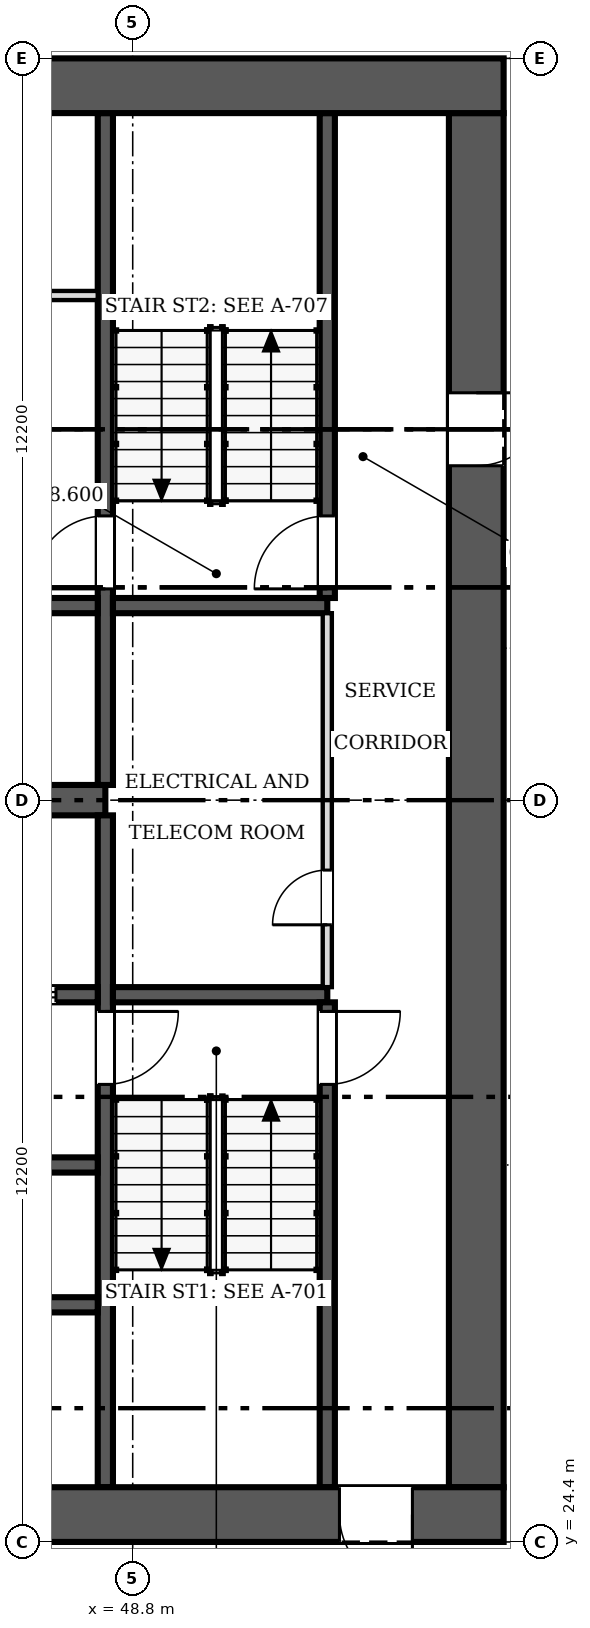
"""IFC4 building model, lengths in metres.
Left out: names, types, materials, properties, quantities, classifications, styles, units other than length and angle.
Written with IfcOpenShell. Run it as: python <this file> out.ifc"""

import sys

from ifc_helpers import new_model, si_unit, direction, frame, frame_2d, origin, place, context, subcontext, project, spatial, rectangle, extrude, source, transform, mapped, element, fill, save


model = new_model("IFC4")
c1 = context("Model", 3, precision=1e-05, world=origin(), true_north=direction((0.0, 1.0)))
c2 = subcontext(c1, "Body", "Model", "MODEL_VIEW")
j1 = project(units=[si_unit("LENGTHUNIT", "METRE"), si_unit("PLANEANGLEUNIT", "RADIAN")], contexts=[c1])
p1 = place(None, origin())
s1 = spatial("IfcSite", under=j1, at=p1, CompositionType="ELEMENT")
p2 = place(p1, origin())
s2 = spatial("IfcBuilding", under=s1, at=p2, CompositionType="ELEMENT")
p3 = place(p2, frame((0.0, 0.0, 48.6)))
s3 = spatial("IfcBuildingStorey", under=s2, at=p3, CompositionType="ELEMENT", Elevation=48.6)
p4 = place(p3, frame((54.9, 24.85, 0.0), z_axis=(0.0, 0.0, 1.0), x_axis=(-1.0, 0.0, 0.0)))
e1 = element("IfcWall", 1, at=p4, inside=s3, PredefinedType="SHEAR", context=c2, shape_type="SweptSolid", body=[
    extrude(rectangle(XDim=24.4, YDim=0.9, at=frame_2d((12.2, 0.0))), origin(), (0.0, 0.0, 1.0), 3.8),
])
m1 = source(origin(), c2, "Body", "SweptSolid", [
    extrude(rectangle(XDim=1.2, YDim=2.1, at=frame_2d((0.6, 1.05))), frame((0.0, 0.46, 0.0), z_axis=(0.0, -1.0, 0.0), x_axis=(1.0, 0.0, 0.0)), (0.0, 0.0, 1.0), 0.92),
])
p5 = place(p4, frame((1.5, 0.0, 0.0)))
e2 = element("IfcOpeningElement", 2, at=p5, cuts=e1, PredefinedType="OPENING", context=c2, shape_type="MappedRepresentation", body=[
    mapped(m1, transform((0.0, 0.0, 0.0), scale=1.0)),
])
p6 = place(p3, frame((30.5, 48.35, 0.0), z_axis=(0.0, 0.0, 1.0), x_axis=(1.0, 0.0, 0.0)))
e3 = element("IfcWall", 3, at=p6, inside=s3, PredefinedType="SHEAR", context=c2, shape_type="SweptSolid", body=[
    extrude(rectangle(XDim=24.4, YDim=0.9, at=frame_2d((12.2, 0.0))), origin(), (0.0, 0.0, 1.0), 3.8),
])
p7 = place(p3, frame((54.45, 47.9, 0.0), z_axis=(0.0, 0.0, 1.0), x_axis=(0.0, -1.0, 0.0)))
e4 = element("IfcWall", 4, at=p7, inside=s3, PredefinedType="SHEAR", context=c2, shape_type="SweptSolid", body=[
    extrude(rectangle(XDim=22.6, YDim=0.9, at=frame_2d((11.3, 0.0))), origin(), (0.0, 0.0, 1.0), 3.8),
])
p8 = place(p7, frame((4.6, 0.0, 0.0)))
e5 = element("IfcOpeningElement", 5, at=p8, cuts=e4, PredefinedType="OPENING", context=c2, shape_type="MappedRepresentation", body=[
    mapped(m1, transform((0.0, 0.0, 0.0), scale=1.0)),
])
p9 = place(p3, frame((31.4, 36.6, 0.0), z_axis=(0.0, 0.0, 1.0), x_axis=(1.0, 0.0, 0.0)))
e6 = element("IfcWall", 6, at=p9, inside=s3, PredefinedType="SHEAR", context=c2, shape_type="SweptSolid", body=[
    extrude(rectangle(XDim=16.95, YDim=0.5, at=frame_2d((8.475, 0.0))), origin(), (0.0, 0.0, 1.0), 3.8),
])
p10 = place(p3, frame((48.35, 36.35, 0.0), z_axis=(0.0, 0.0, 1.0), x_axis=(0.0, -1.0, 0.0)))
e7 = element("IfcWall", 7, at=p10, inside=s3, PredefinedType="SOLIDWALL", context=c2, shape_type="SweptSolid", body=[
    extrude(rectangle(XDim=11.05, YDim=0.25, at=frame_2d((5.525, 0.0))), origin(), (0.0, 0.0, 1.0), 3.8),
])
m2 = source(origin(), c2, "Body", "SweptSolid", [
    extrude(rectangle(XDim=1.2, YDim=2.1, at=frame_2d((0.6, 1.05))), frame((0.0, 0.135, 0.0), z_axis=(0.0, -1.0, 0.0), x_axis=(1.0, 0.0, 0.0)), (0.0, 0.0, 1.0), 0.27),
])
p11 = place(p10, frame((3.225, 0.0, 0.0)))
e8 = element("IfcOpeningElement", 8, at=p11, cuts=e7, PredefinedType="OPENING", context=c2, shape_type="MappedRepresentation", body=[
    mapped(m2, transform((0.0, 0.0, 0.0), scale=1.0)),
])
p12 = place(p3, frame((48.35, 47.9, 0.0), z_axis=(0.0, 0.0, 1.0), x_axis=(0.0, -1.0, 0.0)))
e9 = element("IfcWall", 9, at=p12, inside=s3, PredefinedType="SOLIDWALL", context=c2, shape_type="SweptSolid", body=[
    extrude(rectangle(XDim=11.05, YDim=0.25, at=frame_2d((5.525, 0.0))), origin(), (0.0, 0.0, 1.0), 3.8),
])
p13 = place(p12, frame((6.625, 0.0, 0.0)))
e10 = element("IfcOpeningElement", 10, at=p13, cuts=e9, PredefinedType="OPENING", context=c2, shape_type="MappedRepresentation", body=[
    mapped(m2, transform((0.0, 0.0, 0.0), scale=1.0)),
])
p14 = place(p3, frame((48.225, 33.4, 0.0), z_axis=(0.0, 0.0, 1.0), x_axis=(-1.0, 0.0, 0.0)))
e11 = element("IfcWall", 11, at=p14, inside=s3, PredefinedType="SOLIDWALL", context=c2, shape_type="SweptSolid", body=[
    extrude(rectangle(XDim=5.275, YDim=0.25, at=frame_2d((2.638, 0.0))), origin(), (0.0, 0.0, 1.0), 3.8),
])
p15 = place(p14, frame((3.512, 0.0, 0.0)))
e12 = element("IfcOpeningElement", 12, at=p15, cuts=e11, PredefinedType="OPENING", context=c2, shape_type="MappedRepresentation", body=[
    mapped(m2, transform((0.0, 0.0, 0.0), scale=1.0)),
])
p16 = place(p14, frame((0.688, 0.0, 0.0)))
e13 = element("IfcOpeningElement", 13, at=p16, cuts=e11, PredefinedType="OPENING", context=c2, shape_type="MappedRepresentation", body=[
    mapped(m2, transform((0.0, 0.0, 0.0), scale=1.0)),
])
p17 = place(p3, frame((48.475, 33.4, 0.0), z_axis=(0.0, 0.0, 1.0), x_axis=(1.0, 0.0, 0.0)))
e14 = element("IfcWall", 14, at=p17, inside=s3, PredefinedType="SOLIDWALL", context=c2, shape_type="SweptSolid", body=[
    extrude(rectangle(XDim=3.525, YDim=0.25, at=frame_2d((1.762, 0.0))), origin(), (0.0, 0.0, 1.0), 3.8),
])
for number, where, z_axis, x_axis in (
    (15, (42.95, 28.3, 0.0), (0.0, 0.0, 1.0), (1.0, 0.0, 0.0)),
    (16, (42.95, 39.8, 0.0), (0.0, 0.0, 1.0), (1.0, 0.0, 0.0)),
):
    element("IfcWall", number, at=place(p3, frame(where, z_axis=z_axis, x_axis=x_axis)), inside=s3, PredefinedType="SOLIDWALL", context=c2, shape_type="SweptSolid", body=[
        extrude(rectangle(XDim=5.275, YDim=0.25, at=frame_2d((2.638, 0.0))), origin(), (0.0, 0.0, 1.0), 3.8),
    ])
p18 = place(p3, frame((48.475, 39.8, 0.0), z_axis=(0.0, 0.0, 1.0), x_axis=(1.0, 0.0, 0.0)))
e17 = element("IfcWall", 17, at=p18, inside=s3, PredefinedType="SOLIDWALL", context=c2, shape_type="SweptSolid", body=[
    extrude(rectangle(XDim=3.525, YDim=0.25, at=frame_2d((1.762, 0.0))), origin(), (0.0, 0.0, 1.0), 3.8),
])
p19 = place(p3, frame((52.0, 25.3, 0.0), z_axis=(0.0, 0.0, 1.0), x_axis=(0.0, 1.0, 0.0)))
e18 = element("IfcWall", 18, at=p19, inside=s3, PredefinedType="SOLIDWALL", context=c2, shape_type="SweptSolid", body=[
    extrude(rectangle(XDim=7.975, YDim=0.25, at=frame_2d((3.987, 0.0))), origin(), (0.0, 0.0, 1.0), 3.8),
])
p20 = place(p19, frame((6.625, 0.0, 0.0)))
e19 = element("IfcOpeningElement", 19, at=p20, cuts=e18, PredefinedType="OPENING", context=c2, shape_type="MappedRepresentation", body=[
    mapped(m2, transform((0.0, 0.0, 0.0), scale=1.0)),
])
p21 = place(p3, frame((52.0, 39.925, 0.0), z_axis=(0.0, 0.0, 1.0), x_axis=(0.0, 1.0, 0.0)))
e20 = element("IfcWall", 20, at=p21, inside=s3, PredefinedType="SOLIDWALL", context=c2, shape_type="SweptSolid", body=[
    extrude(rectangle(XDim=7.975, YDim=0.25, at=frame_2d((3.987, 0.0))), origin(), (0.0, 0.0, 1.0), 3.8),
])
p22 = place(p21, frame((0.15, 0.0, 0.0)))
e21 = element("IfcOpeningElement", 21, at=p22, cuts=e20, PredefinedType="OPENING", context=c2, shape_type="MappedRepresentation", body=[
    mapped(m2, transform((0.0, 0.0, 0.0), scale=1.0)),
])
p23 = place(p3, frame((42.95, 30.6, 0.0), z_axis=(0.0, 0.0, 1.0), x_axis=(1.0, 0.0, 0.0)))
e22 = element("IfcWall", 22, at=p23, inside=s3, PredefinedType="SOLIDWALL", context=c2, shape_type="SweptSolid", body=[
    extrude(rectangle(XDim=5.275, YDim=0.25, at=frame_2d((2.638, 0.0))), origin(), (0.0, 0.0, 1.0), 3.8),
])
p24 = place(p3, frame((52.0, 33.525, 0.0), z_axis=(0.0, 0.0, 1.0), x_axis=(0.0, 1.0, 0.0)))
e23 = element("IfcWall", 23, at=p24, inside=s3, PredefinedType="PARTITIONING", context=c2, shape_type="SweptSolid", body=[
    extrude(rectangle(XDim=6.15, YDim=0.15, at=frame_2d((3.075, 0.0))), origin(), (0.0, 0.0, 1.0), 3.6),
])
m3 = source(origin(), c2, "Body", "SweptSolid", [
    extrude(rectangle(XDim=0.9, YDim=2.1, at=frame_2d((0.45, 1.05))), frame((0.0, 0.085, 0.0), z_axis=(0.0, -1.0, 0.0), x_axis=(1.0, 0.0, 0.0)), (0.0, 0.0, 1.0), 0.17),
])
p25 = place(p24, frame((1.025, 0.0, 0.0)))
e24 = element("IfcOpeningElement", 24, at=p25, cuts=e23, PredefinedType="OPENING", context=c2, shape_type="MappedRepresentation", body=[
    mapped(m3, transform((0.0, 0.0, 0.0), scale=1.0)),
])
p26 = place(p3, frame((45.65, 44.9, 0.0), z_axis=(0.0, 0.0, 1.0), x_axis=(1.0, 0.0, 0.0)))
e25 = element("IfcWall", 25, at=p26, inside=s3, PredefinedType="PARTITIONING", context=c2, shape_type="SweptSolid", body=[
    extrude(rectangle(XDim=2.575, YDim=0.15, at=frame_2d((1.288, 0.0))), origin(), (0.0, 0.0, 1.0), 3.6),
])
p27 = place(p26, frame((0.8, 0.0, 0.0)))
e26 = element("IfcOpeningElement", 26, at=p27, cuts=e25, PredefinedType="OPENING", context=c2, shape_type="MappedRepresentation", body=[
    mapped(m3, transform((0.0, 0.0, 0.0), scale=1.0)),
])
m4 = source(origin(), c2, "Body", "SweptSolid", [
    extrude(rectangle(XDim=1.2, YDim=2.1, at=frame_2d((0.6, 1.05))), frame((0.0, 0.025, 0.0), z_axis=(0.0, -1.0, 0.0), x_axis=(1.0, 0.0, 0.0)), (0.0, 0.0, 1.0), 0.05),
])
p28 = place(p5, origin())
e27 = element("IfcDoor", 27, at=p28, inside=s3, OperationType="SINGLE_SWING_LEFT", PredefinedType="DOOR", context=c2, shape_type="MappedRepresentation", body=[
    mapped(m4, transform((0.0, 0.0, 0.0), scale=1.0)),
])
fill(e2, e27)
p29 = place(p8, origin())
e28 = element("IfcDoor", 28, at=p29, inside=s3, OperationType="SINGLE_SWING_LEFT", PredefinedType="DOOR", context=c2, shape_type="MappedRepresentation", body=[
    mapped(m4, transform((0.0, 0.0, 0.0), scale=1.0)),
])
fill(e5, e28)
p30 = place(p11, origin())
e29 = element("IfcDoor", 29, at=p30, inside=s3, OperationType="SINGLE_SWING_LEFT", PredefinedType="DOOR", context=c2, shape_type="MappedRepresentation", body=[
    mapped(m4, transform((0.0, 0.0, 0.0), scale=1.0)),
])
fill(e8, e29)
p31 = place(p13, origin())
e30 = element("IfcDoor", 30, at=p31, inside=s3, OperationType="SINGLE_SWING_RIGHT", PredefinedType="DOOR", context=c2, shape_type="MappedRepresentation", body=[
    mapped(m4, transform((0.0, 0.0, 0.0), scale=1.0)),
])
fill(e10, e30)
p32 = place(p16, origin())
e31 = element("IfcDoor", 31, at=p32, inside=s3, OperationType="DOUBLE_DOOR_SLIDING", PredefinedType="DOOR", context=c2, shape_type="MappedRepresentation", body=[
    mapped(m4, transform((0.0, 0.0, 0.0), scale=1.0)),
])
fill(e13, e31)
p33 = place(p20, origin())
e32 = element("IfcDoor", 32, at=p33, inside=s3, OperationType="SINGLE_SWING_RIGHT", PredefinedType="DOOR", context=c2, shape_type="MappedRepresentation", body=[
    mapped(m4, transform((0.0, 0.0, 0.0), scale=1.0)),
])
fill(e19, e32)
p34 = place(p22, origin())
e33 = element("IfcDoor", 33, at=p34, inside=s3, OperationType="SINGLE_SWING_LEFT", PredefinedType="DOOR", context=c2, shape_type="MappedRepresentation", body=[
    mapped(m4, transform((0.0, 0.0, 0.0), scale=1.0)),
])
fill(e21, e33)
m5 = source(origin(), c2, "Body", "SweptSolid", [
    extrude(rectangle(XDim=0.9, YDim=2.1, at=frame_2d((0.45, 1.05))), frame((0.0, 0.025, 0.0), z_axis=(0.0, -1.0, 0.0), x_axis=(1.0, 0.0, 0.0)), (0.0, 0.0, 1.0), 0.05),
])
p35 = place(p25, origin())
e34 = element("IfcDoor", 34, at=p35, inside=s3, OperationType="SINGLE_SWING_LEFT", PredefinedType="DOOR", context=c2, shape_type="MappedRepresentation", body=[
    mapped(m5, transform((0.0, 0.0, 0.0), scale=1.0)),
])
fill(e24, e34)
save(model, sys.argv[1])
